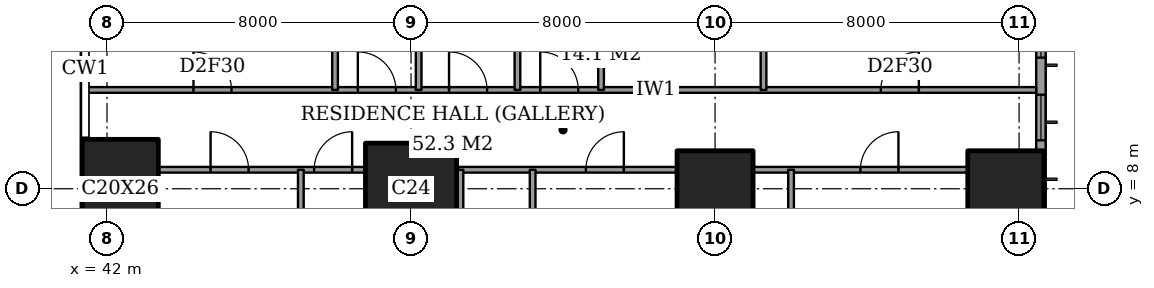
"""IFC4 building model, lengths in metres.
Left out: names, types, materials, properties, quantities, classifications, styles, units other than length and angle.
Written with IfcOpenShell. Run it as: python <this file> out.ifc"""

import sys

from ifc_helpers import new_model, si_unit, direction, frame, frame_2d, origin, origin_2d, place, context, subcontext, project, spatial, rectangle, extrude, element, fill, save


model = new_model("IFC4")
c1 = context("Model", 3, precision=1e-05, world=origin(), true_north=direction((0.0, 1.0)))
c2 = subcontext(c1, "Body", "Model", "MODEL_VIEW")
j1 = project(units=[si_unit("LENGTHUNIT", "METRE"), si_unit("PLANEANGLEUNIT", "RADIAN")], contexts=[c1])
p1 = place(None, origin())
s1 = spatial("IfcSite", under=j1, at=p1, CompositionType="ELEMENT")
p2 = place(p1, origin())
s2 = spatial("IfcBuilding", under=s1, at=p2, CompositionType="ELEMENT")
p3 = place(p2, frame((0.0, 0.0, 65.6)))
s3 = spatial("IfcBuildingStorey", under=s2, at=p3, CompositionType="ELEMENT", Elevation=65.6)
p4 = place(p3, frame((42.35, 8.0, 0.0), z_axis=(0.0, 0.0, 1.0), x_axis=(1.0, 0.0, 0.0)))
e1 = element("IfcColumn", 1, at=p4, inside=s3, PredefinedType="COLUMN", context=c2, shape_type="SweptSolid", body=[
    extrude(rectangle(XDim=2.0, YDim=2.6, at=origin_2d()), origin(), (0.0, 0.0, 1.0), 3.6),
])
p5 = place(p3, frame((50.0, 8.0, 0.0), z_axis=(0.0, 0.0, 1.0), x_axis=(1.0, 0.0, 0.0)))
e2 = element("IfcColumn", 2, at=p5, inside=s3, PredefinedType="COLUMN", context=c2, shape_type="SweptSolid", body=[
    extrude(rectangle(XDim=2.4, YDim=2.4, at=origin_2d()), origin(), (0.0, 0.0, 1.0), 3.6),
])
for number, where, z_axis, x_axis in (
    (3, (58.0, 8.0, 0.0), (0.0, 0.0, 1.0), (1.0, 0.0, 0.0)),
    (4, (65.65, 8.0, 0.0), (0.0, 0.0, 1.0), (1.0, 0.0, 0.0)),
):
    element("IfcColumn", number, at=place(p3, frame(where, z_axis=z_axis, x_axis=x_axis)), inside=s3, PredefinedType="COLUMN", context=c2, shape_type="SweptSolid", body=[
        extrude(rectangle(XDim=2.0, YDim=2.0, at=origin_2d()), origin(), (0.0, 0.0, 1.0), 3.6),
    ])
p6 = place(p3, frame((66.575, 3.175, 0.0), z_axis=(0.0, 0.0, 1.0), x_axis=(0.0, 1.0, 0.0)))
e5 = element("IfcWall", 5, at=p6, inside=s3, PredefinedType="SOLIDWALL", context=c2, shape_type="SweptSolid", body=[
    extrude(rectangle(XDim=41.65, YDim=0.25, at=frame_2d((20.825, 0.0))), origin(), (0.0, 0.0, 1.0), 3.6),
])
p7 = place(p6, frame((0.775, 0.0, 0.6)))
e6 = element("IfcOpeningElement", 6, at=p7, cuts=e5, PredefinedType="OPENING", context=c2, shape_type="SweptSolid", body=[
    extrude(rectangle(XDim=2.4, YDim=2.0, at=frame_2d((1.2, 1.0))), frame((0.0, 0.135, 0.0), z_axis=(0.0, -1.0, 0.0), x_axis=(1.0, 0.0, 0.0)), (0.0, 0.0, 1.0), 0.27),
])
p8 = place(p6, frame((6.1, 0.0, 0.6)))
e7 = element("IfcOpeningElement", 7, at=p8, cuts=e5, PredefinedType="OPENING", context=c2, shape_type="SweptSolid", body=[
    extrude(rectangle(XDim=1.2, YDim=2.0, at=frame_2d((0.6, 1.0))), frame((0.0, 0.135, 0.0), z_axis=(0.0, -1.0, 0.0), x_axis=(1.0, 0.0, 0.0)), (0.0, 0.0, 1.0), 0.27),
])
p9 = place(p6, frame((8.275, 0.0, 0.6)))
e8 = element("IfcOpeningElement", 8, at=p9, cuts=e5, PredefinedType="OPENING", context=c2, shape_type="SweptSolid", body=[
    extrude(rectangle(XDim=2.4, YDim=2.0, at=frame_2d((1.2, 1.0))), frame((0.0, 0.135, 0.0), z_axis=(0.0, -1.0, 0.0), x_axis=(1.0, 0.0, 0.0)), (0.0, 0.0, 1.0), 0.27),
])
p10 = place(p6, frame((15.775, 0.0, 0.6)))
e9 = element("IfcOpeningElement", 9, at=p10, cuts=e5, PredefinedType="OPENING", context=c2, shape_type="SweptSolid", body=[
    extrude(rectangle(XDim=2.4, YDim=2.0, at=frame_2d((1.2, 1.0))), frame((0.0, 0.135, 0.0), z_axis=(0.0, -1.0, 0.0), x_axis=(1.0, 0.0, 0.0)), (0.0, 0.0, 1.0), 0.27),
])
p11 = place(p6, frame((23.475, 0.0, 0.6)))
e10 = element("IfcOpeningElement", 10, at=p11, cuts=e5, PredefinedType="OPENING", context=c2, shape_type="SweptSolid", body=[
    extrude(rectangle(XDim=2.4, YDim=2.0, at=frame_2d((1.2, 1.0))), frame((0.0, 0.135, 0.0), z_axis=(0.0, -1.0, 0.0), x_axis=(1.0, 0.0, 0.0)), (0.0, 0.0, 1.0), 0.27),
])
p12 = place(p6, frame((30.875, 0.0, 0.6)))
e11 = element("IfcOpeningElement", 11, at=p12, cuts=e5, PredefinedType="OPENING", context=c2, shape_type="SweptSolid", body=[
    extrude(rectangle(XDim=2.4, YDim=2.0, at=frame_2d((1.2, 1.0))), frame((0.0, 0.135, 0.0), z_axis=(0.0, -1.0, 0.0), x_axis=(1.0, 0.0, 0.0)), (0.0, 0.0, 1.0), 0.27),
])
p13 = place(p6, frame((34.325, 0.0, 0.6)))
e12 = element("IfcOpeningElement", 12, at=p13, cuts=e5, PredefinedType="OPENING", context=c2, shape_type="SweptSolid", body=[
    extrude(rectangle(XDim=1.2, YDim=2.0, at=frame_2d((0.6, 1.0))), frame((0.0, 0.135, 0.0), z_axis=(0.0, -1.0, 0.0), x_axis=(1.0, 0.0, 0.0)), (0.0, 0.0, 1.0), 0.27),
])
p14 = place(p6, frame((38.475, 0.0, 0.6)))
e13 = element("IfcOpeningElement", 13, at=p14, cuts=e5, PredefinedType="OPENING", context=c2, shape_type="SweptSolid", body=[
    extrude(rectangle(XDim=2.4, YDim=2.0, at=frame_2d((1.2, 1.0))), frame((0.0, 0.135, 0.0), z_axis=(0.0, -1.0, 0.0), x_axis=(1.0, 0.0, 0.0)), (0.0, 0.0, 1.0), 0.27),
])
p15 = place(p3, frame((43.35, 8.5, 0.0), z_axis=(0.0, 0.0, 1.0), x_axis=(1.0, 0.0, 0.0)))
e14 = element("IfcWall", 14, at=p15, inside=s3, PredefinedType="PARTITIONING", context=c2, shape_type="SweptSolid", body=[
    extrude(rectangle(XDim=5.45, YDim=0.15, at=frame_2d((2.725, 0.0))), origin(), (0.0, 0.0, 1.0), 3.35),
])
p16 = place(p15, frame((4.1, 0.0, 0.0)))
e15 = element("IfcOpeningElement", 15, at=p16, cuts=e14, PredefinedType="OPENING", context=c2, shape_type="SweptSolid", body=[
    extrude(rectangle(XDim=1.0, YDim=2.1, at=frame_2d((0.5, 1.05))), frame((0.0, 0.085, 0.0), z_axis=(0.0, -1.0, 0.0), x_axis=(1.0, 0.0, 0.0)), (0.0, 0.0, 1.0), 0.17),
])
p17 = place(p15, frame((1.375, 0.0, 0.0)))
e16 = element("IfcOpeningElement", 16, at=p17, cuts=e14, PredefinedType="OPENING", context=c2, shape_type="SweptSolid", body=[
    extrude(rectangle(XDim=1.0, YDim=2.1, at=frame_2d((0.5, 1.05))), frame((0.0, 0.085, 0.0), z_axis=(0.0, -1.0, 0.0), x_axis=(1.0, 0.0, 0.0)), (0.0, 0.0, 1.0), 0.17),
])
p18 = place(p3, frame((51.2, 8.5, 0.0), z_axis=(0.0, 0.0, 1.0), x_axis=(1.0, 0.0, 0.0)))
e17 = element("IfcWall", 17, at=p18, inside=s3, PredefinedType="PARTITIONING", context=c2, shape_type="SweptSolid", body=[
    extrude(rectangle(XDim=5.8, YDim=0.15, at=frame_2d((2.9, 0.0))), origin(), (0.0, 0.0, 1.0), 3.35),
])
p19 = place(p18, frame((3.4, 0.0, 0.0)))
e18 = element("IfcOpeningElement", 18, at=p19, cuts=e17, PredefinedType="OPENING", context=c2, shape_type="SweptSolid", body=[
    extrude(rectangle(XDim=1.0, YDim=2.1, at=frame_2d((0.5, 1.05))), frame((0.0, 0.085, 0.0), z_axis=(0.0, -1.0, 0.0), x_axis=(1.0, 0.0, 0.0)), (0.0, 0.0, 1.0), 0.17),
])
p20 = place(p3, frame((59.0, 8.5, 0.0), z_axis=(0.0, 0.0, 1.0), x_axis=(1.0, 0.0, 0.0)))
e19 = element("IfcWall", 19, at=p20, inside=s3, PredefinedType="PARTITIONING", context=c2, shape_type="SweptSolid", body=[
    extrude(rectangle(XDim=5.65, YDim=0.15, at=frame_2d((2.825, 0.0))), origin(), (0.0, 0.0, 1.0), 3.35),
])
p21 = place(p20, frame((2.825, 0.0, 0.0)))
e20 = element("IfcOpeningElement", 20, at=p21, cuts=e19, PredefinedType="OPENING", context=c2, shape_type="SweptSolid", body=[
    extrude(rectangle(XDim=1.0, YDim=2.1, at=frame_2d((0.5, 1.05))), frame((0.0, 0.085, 0.0), z_axis=(0.0, -1.0, 0.0), x_axis=(1.0, 0.0, 0.0)), (0.0, 0.0, 1.0), 0.17),
])
p22 = place(p3, frame((41.439, 10.6, 0.0), z_axis=(0.0, 0.0, 1.0), x_axis=(1.0, 0.0, 0.0)))
e21 = element("IfcWall", 21, at=p22, inside=s3, PredefinedType="PARTITIONING", context=c2, shape_type="SweptSolid", body=[
    extrude(rectangle(XDim=25.011, YDim=0.15, at=frame_2d((12.505, 0.0))), origin(), (0.0, 0.0, 1.0), 3.35),
])
p23 = place(p22, frame((11.961, 0.0, 0.0)))
e22 = element("IfcOpeningElement", 22, at=p23, cuts=e21, PredefinedType="OPENING", context=c2, shape_type="SweptSolid", body=[
    extrude(rectangle(XDim=1.0, YDim=2.1, at=frame_2d((0.5, 1.05))), frame((0.0, 0.085, 0.0), z_axis=(0.0, -1.0, 0.0), x_axis=(1.0, 0.0, 0.0)), (0.0, 0.0, 1.0), 0.17),
])
p24 = place(p22, frame((20.924, 0.0, 0.0)))
e23 = element("IfcOpeningElement", 23, at=p24, cuts=e21, PredefinedType="OPENING", context=c2, shape_type="SweptSolid", body=[
    extrude(rectangle(XDim=1.0, YDim=2.1, at=frame_2d((0.5, 1.05))), frame((0.0, 0.085, 0.0), z_axis=(0.0, -1.0, 0.0), x_axis=(1.0, 0.0, 0.0)), (0.0, 0.0, 1.0), 0.17),
])
p25 = place(p22, frame((9.561, 0.0, 0.0)))
e24 = element("IfcOpeningElement", 24, at=p25, cuts=e21, PredefinedType="OPENING", context=c2, shape_type="SweptSolid", body=[
    extrude(rectangle(XDim=1.0, YDim=2.1, at=frame_2d((0.5, 1.05))), frame((0.0, 0.085, 0.0), z_axis=(0.0, -1.0, 0.0), x_axis=(1.0, 0.0, 0.0)), (0.0, 0.0, 1.0), 0.17),
])
p26 = place(p22, frame((7.161, 0.0, 0.0)))
e25 = element("IfcOpeningElement", 25, at=p26, cuts=e21, PredefinedType="OPENING", context=c2, shape_type="SweptSolid", body=[
    extrude(rectangle(XDim=1.0, YDim=2.1, at=frame_2d((0.5, 1.05))), frame((0.0, 0.085, 0.0), z_axis=(0.0, -1.0, 0.0), x_axis=(1.0, 0.0, 0.0)), (0.0, 0.0, 1.0), 0.17),
])
p27 = place(p22, frame((2.836, 0.0, 0.0)))
e26 = element("IfcOpeningElement", 26, at=p27, cuts=e21, PredefinedType="OPENING", context=c2, shape_type="SweptSolid", body=[
    extrude(rectangle(XDim=1.0, YDim=2.1, at=frame_2d((0.5, 1.05))), frame((0.0, 0.085, 0.0), z_axis=(0.0, -1.0, 0.0), x_axis=(1.0, 0.0, 0.0)), (0.0, 0.0, 1.0), 0.17),
])
p28 = place(p3, frame((47.1, -0.45, 0.0), z_axis=(0.0, 0.0, 1.0), x_axis=(0.0, 1.0, 0.0)))
e27 = element("IfcWall", 27, at=p28, inside=s3, PredefinedType="PARTITIONING", context=c2, shape_type="SweptSolid", body=[
    extrude(rectangle(XDim=8.95, YDim=0.15, at=frame_2d((4.475, 0.0))), origin(), (0.0, 0.0, 1.0), 3.35),
])
p29 = place(p3, frame((48.0, 10.6, 0.0), z_axis=(0.0, 0.0, 1.0), x_axis=(0.0, 1.0, 0.0)))
e28 = element("IfcWall", 28, at=p29, inside=s3, PredefinedType="PARTITIONING", context=c2, shape_type="SweptSolid", body=[
    extrude(rectangle(XDim=6.4, YDim=0.15, at=frame_2d((3.2, 0.0))), origin(), (0.0, 0.0, 1.0), 3.35),
])
p30 = place(p3, frame((50.2, 10.6, 0.0), z_axis=(0.0, 0.0, 1.0), x_axis=(0.0, 1.0, 0.0)))
e29 = element("IfcWall", 29, at=p30, inside=s3, PredefinedType="PARTITIONING", context=c2, shape_type="SweptSolid", body=[
    extrude(rectangle(XDim=4.2, YDim=0.15, at=frame_2d((2.1, 0.0))), origin(), (0.0, 0.0, 1.0), 3.35),
])
p31 = place(p3, frame((51.3, -0.45, 0.0), z_axis=(0.0, 0.0, 1.0), x_axis=(0.0, 1.0, 0.0)))
e30 = element("IfcWall", 30, at=p31, inside=s3, PredefinedType="PARTITIONING", context=c2, shape_type="SweptSolid", body=[
    extrude(rectangle(XDim=8.95, YDim=0.15, at=frame_2d((4.475, 0.0))), origin(), (0.0, 0.0, 1.0), 3.35),
])
p32 = place(p31, frame((4.025, 0.0, 0.0)))
e31 = element("IfcOpeningElement", 31, at=p32, cuts=e30, PredefinedType="OPENING", context=c2, shape_type="SweptSolid", body=[
    extrude(rectangle(XDim=0.9, YDim=2.1, at=frame_2d((0.45, 1.05))), frame((0.0, 0.085, 0.0), z_axis=(0.0, -1.0, 0.0), x_axis=(1.0, 0.0, 0.0)), (0.0, 0.0, 1.0), 0.17),
])
p33 = place(p3, frame((52.8, 10.6, 0.0), z_axis=(0.0, 0.0, 1.0), x_axis=(0.0, 1.0, 0.0)))
e32 = element("IfcWall", 32, at=p33, inside=s3, PredefinedType="PARTITIONING", context=c2, shape_type="SweptSolid", body=[
    extrude(rectangle(XDim=6.4, YDim=0.15, at=frame_2d((3.2, 0.0))), origin(), (0.0, 0.0, 1.0), 3.35),
])
p34 = place(p3, frame((53.2, -0.45, 0.0), z_axis=(0.0, 0.0, 1.0), x_axis=(0.0, 1.0, 0.0)))
e33 = element("IfcWall", 33, at=p34, inside=s3, PredefinedType="PARTITIONING", context=c2, shape_type="SweptSolid", body=[
    extrude(rectangle(XDim=8.95, YDim=0.15, at=frame_2d((4.475, 0.0))), origin(), (0.0, 0.0, 1.0), 3.35),
])
p35 = place(p3, frame((55.0, 10.6, 0.0), z_axis=(0.0, 0.0, 1.0), x_axis=(0.0, 1.0, 0.0)))
e34 = element("IfcWall", 34, at=p35, inside=s3, PredefinedType="PARTITIONING", context=c2, shape_type="SweptSolid", body=[
    extrude(rectangle(XDim=11.0, YDim=0.15, at=frame_2d((5.5, 0.0))), origin(), (0.0, 0.0, 1.0), 3.35),
])
p36 = place(p35, frame((8.2, 0.0, 0.0)))
e35 = element("IfcOpeningElement", 35, at=p36, cuts=e34, PredefinedType="OPENING", context=c2, shape_type="SweptSolid", body=[
    extrude(rectangle(XDim=1.0, YDim=2.1, at=frame_2d((0.5, 1.05))), frame((0.0, 0.085, 0.0), z_axis=(0.0, -1.0, 0.0), x_axis=(1.0, 0.0, 0.0)), (0.0, 0.0, 1.0), 0.17),
])
p37 = place(p3, frame((59.275, 10.6, 0.0), z_axis=(0.0, 0.0, 1.0), x_axis=(0.0, 1.0, 0.0)))
e36 = element("IfcWall", 36, at=p37, inside=s3, PredefinedType="PARTITIONING", context=c2, shape_type="SweptSolid", body=[
    extrude(rectangle(XDim=4.2, YDim=0.15, at=frame_2d((2.1, 0.0))), origin(), (0.0, 0.0, 1.0), 3.35),
])
p38 = place(p37, frame((1.25, 0.0, 0.0)))
e37 = element("IfcOpeningElement", 37, at=p38, cuts=e36, PredefinedType="OPENING", context=c2, shape_type="SweptSolid", body=[
    extrude(rectangle(XDim=0.9, YDim=2.1, at=frame_2d((0.45, 1.05))), frame((0.0, 0.085, 0.0), z_axis=(0.0, -1.0, 0.0), x_axis=(1.0, 0.0, 0.0)), (0.0, 0.0, 1.0), 0.17),
])
p39 = place(p3, frame((60.0, -0.45, 0.0), z_axis=(0.0, 0.0, 1.0), x_axis=(0.0, 1.0, 0.0)))
e38 = element("IfcWall", 38, at=p39, inside=s3, PredefinedType="PARTITIONING", context=c2, shape_type="SweptSolid", body=[
    extrude(rectangle(XDim=8.95, YDim=0.15, at=frame_2d((4.475, 0.0))), origin(), (0.0, 0.0, 1.0), 3.35),
])
p40 = place(p8, origin())
e39 = element("IfcWindow", 39, at=p40, inside=s3, PartitioningType="SINGLE_PANEL", PredefinedType="WINDOW", context=c2, shape_type="SweptSolid", body=[
    extrude(rectangle(XDim=1.2, YDim=2.0, at=frame_2d((0.6, 1.0))), frame((0.0, 0.03, 0.0), z_axis=(0.0, -1.0, 0.0), x_axis=(1.0, 0.0, 0.0)), (0.0, 0.0, 1.0), 0.06),
])
fill(e7, e39)
p41 = place(p9, origin())
e40 = element("IfcWindow", 40, at=p41, inside=s3, PartitioningType="SINGLE_PANEL", PredefinedType="WINDOW", context=c2, shape_type="SweptSolid", body=[
    extrude(rectangle(XDim=2.4, YDim=2.0, at=frame_2d((1.2, 1.0))), frame((0.0, 0.03, 0.0), z_axis=(0.0, -1.0, 0.0), x_axis=(1.0, 0.0, 0.0)), (0.0, 0.0, 1.0), 0.06),
])
fill(e8, e40)
p42 = place(p21, origin())
e41 = element("IfcDoor", 41, at=p42, inside=s3, OperationType="SINGLE_SWING_LEFT", PredefinedType="DOOR", context=c2, shape_type="SweptSolid", body=[
    extrude(rectangle(XDim=1.0, YDim=2.1, at=frame_2d((0.5, 1.05))), frame((0.0, 0.025, 0.0), z_axis=(0.0, -1.0, 0.0), x_axis=(1.0, 0.0, 0.0)), (0.0, 0.0, 1.0), 0.05),
])
fill(e20, e41)
p43 = place(p19, origin())
e42 = element("IfcDoor", 42, at=p43, inside=s3, OperationType="SINGLE_SWING_LEFT", PredefinedType="DOOR", context=c2, shape_type="SweptSolid", body=[
    extrude(rectangle(XDim=1.0, YDim=2.1, at=frame_2d((0.5, 1.05))), frame((0.0, 0.025, 0.0), z_axis=(0.0, -1.0, 0.0), x_axis=(1.0, 0.0, 0.0)), (0.0, 0.0, 1.0), 0.05),
])
fill(e18, e42)
p44 = place(p16, origin())
e43 = element("IfcDoor", 43, at=p44, inside=s3, OperationType="SINGLE_SWING_LEFT", PredefinedType="DOOR", context=c2, shape_type="SweptSolid", body=[
    extrude(rectangle(XDim=1.0, YDim=2.1, at=frame_2d((0.5, 1.05))), frame((0.0, 0.025, 0.0), z_axis=(0.0, -1.0, 0.0), x_axis=(1.0, 0.0, 0.0)), (0.0, 0.0, 1.0), 0.05),
])
fill(e15, e43)
p45 = place(p17, origin())
e44 = element("IfcDoor", 44, at=p45, inside=s3, OperationType="SINGLE_SWING_RIGHT", PredefinedType="DOOR", context=c2, shape_type="SweptSolid", body=[
    extrude(rectangle(XDim=1.0, YDim=2.1, at=frame_2d((0.5, 1.05))), frame((0.0, 0.025, 0.0), z_axis=(0.0, -1.0, 0.0), x_axis=(1.0, 0.0, 0.0)), (0.0, 0.0, 1.0), 0.05),
])
fill(e16, e44)
p46 = place(p23, origin())
e45 = element("IfcDoor", 45, at=p46, inside=s3, OperationType="SINGLE_SWING_RIGHT", PredefinedType="DOOR", context=c2, shape_type="SweptSolid", body=[
    extrude(rectangle(XDim=1.0, YDim=2.1, at=frame_2d((0.5, 1.05))), frame((0.0, 0.025, 0.0), z_axis=(0.0, -1.0, 0.0), x_axis=(1.0, 0.0, 0.0)), (0.0, 0.0, 1.0), 0.05),
])
fill(e22, e45)
p47 = place(p24, origin())
e46 = element("IfcDoor", 46, at=p47, inside=s3, OperationType="SINGLE_SWING_LEFT", PredefinedType="DOOR", context=c2, shape_type="SweptSolid", body=[
    extrude(rectangle(XDim=1.0, YDim=2.1, at=frame_2d((0.5, 1.05))), frame((0.0, 0.025, 0.0), z_axis=(0.0, -1.0, 0.0), x_axis=(1.0, 0.0, 0.0)), (0.0, 0.0, 1.0), 0.05),
])
fill(e23, e46)
p48 = place(p25, origin())
e47 = element("IfcDoor", 47, at=p48, inside=s3, OperationType="SINGLE_SWING_RIGHT", PredefinedType="DOOR", context=c2, shape_type="SweptSolid", body=[
    extrude(rectangle(XDim=1.0, YDim=2.1, at=frame_2d((0.5, 1.05))), frame((0.0, 0.025, 0.0), z_axis=(0.0, -1.0, 0.0), x_axis=(1.0, 0.0, 0.0)), (0.0, 0.0, 1.0), 0.05),
])
fill(e24, e47)
p49 = place(p26, origin())
e48 = element("IfcDoor", 48, at=p49, inside=s3, OperationType="SINGLE_SWING_RIGHT", PredefinedType="DOOR", context=c2, shape_type="SweptSolid", body=[
    extrude(rectangle(XDim=1.0, YDim=2.1, at=frame_2d((0.5, 1.05))), frame((0.0, 0.025, 0.0), z_axis=(0.0, -1.0, 0.0), x_axis=(1.0, 0.0, 0.0)), (0.0, 0.0, 1.0), 0.05),
])
fill(e25, e48)
p50 = place(p27, origin())
e49 = element("IfcDoor", 49, at=p50, inside=s3, OperationType="SINGLE_SWING_RIGHT", PredefinedType="DOOR", context=c2, shape_type="SweptSolid", body=[
    extrude(rectangle(XDim=1.0, YDim=2.1, at=frame_2d((0.5, 1.05))), frame((0.0, 0.025, 0.0), z_axis=(0.0, -1.0, 0.0), x_axis=(1.0, 0.0, 0.0)), (0.0, 0.0, 1.0), 0.05),
])
fill(e26, e49)
save(model, sys.argv[1])
